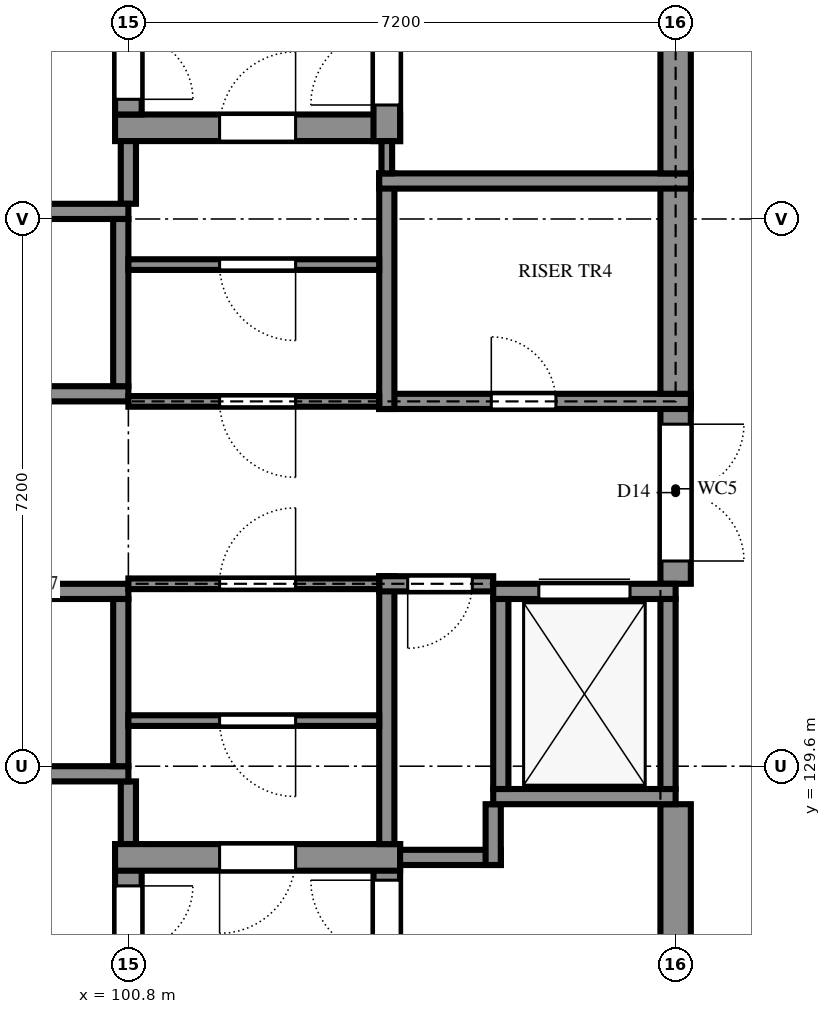
"""IFC4 building model, lengths in metres.
Left out: names, types, materials, properties, quantities, classifications, styles, units other than length and angle.
Written with IfcOpenShell. Run it as: python <this file> out.ifc"""

import sys

from ifc_helpers import new_model, si_unit, direction, frame, frame_2d, origin, place, context, subcontext, project, spatial, rectangle, extrude, element, fill, save


model = new_model("IFC4")
c1 = context("Model", 3, precision=1e-05, world=origin(), true_north=direction((0.0, 1.0)))
c2 = subcontext(c1, "Body", "Model", "MODEL_VIEW")
j1 = project(units=[si_unit("LENGTHUNIT", "METRE"), si_unit("PLANEANGLEUNIT", "RADIAN")], contexts=[c1])
p1 = place(None, origin())
s1 = spatial("IfcSite", under=j1, at=p1, CompositionType="ELEMENT")
p2 = place(p1, origin())
s2 = spatial("IfcBuilding", under=s1, at=p2, CompositionType="ELEMENT")
p3 = place(p2, origin())
s3 = spatial("IfcBuildingStorey", under=s2, at=p3, CompositionType="ELEMENT", Elevation=0.0)
p4 = place(p3, frame((108.0, 122.4, 0.0), z_axis=(0.0, 0.0, 1.0), x_axis=(0.0, 1.0, 0.0)))
e1 = element("IfcWall", 1, at=p4, inside=s3, PredefinedType="SHEAR", context=c2, shape_type="SweptSolid", body=[
    extrude(rectangle(XDim=6.7, YDim=0.4, at=frame_2d((3.35, 0.0))), origin(), (0.0, 0.0, 1.0), 3.6),
])
p5 = place(p3, frame((104.2, 125.1, 0.0), z_axis=(0.0, 0.0, 1.0), x_axis=(0.0, 1.0, 0.0)))
e2 = element("IfcWall", 2, at=p5, inside=s3, PredefinedType="SHEAR", context=c2, shape_type="SweptSolid", body=[
    extrude(rectangle(XDim=3.475, YDim=0.35, at=frame_2d((1.737, 0.0))), origin(), (0.0, 0.0, 1.0), 3.6),
])
p6 = place(p5, frame((2.0, 0.0, 0.0)))
e3 = element("IfcOpeningElement", 3, at=p6, cuts=e2, PredefinedType="OPENING", context=c2, shape_type="SweptSolid", body=[
    extrude(rectangle(XDim=1.0, YDim=2.1, at=frame_2d((0.5, 1.05))), frame((0.0, 0.185, 0.0), z_axis=(0.0, -1.0, 0.0), x_axis=(1.0, 0.0, 0.0)), (0.0, 0.0, 1.0), 0.37),
])
p7 = place(p3, frame((100.8, 128.575, 0.0), z_axis=(0.0, 0.0, 1.0), x_axis=(0.0, -1.0, 0.0)))
e4 = element("IfcWall", 4, at=p7, inside=s3, PredefinedType="SHEAR", context=c2, shape_type="SweptSolid", body=[
    extrude(rectangle(XDim=6.35, YDim=0.35, at=frame_2d((3.175, 0.0))), origin(), (0.0, 0.0, 1.0), 3.6),
])
p8 = place(p7, frame((0.55, 0.0, 0.0)))
e5 = element("IfcOpeningElement", 5, at=p8, cuts=e4, PredefinedType="OPENING", context=c2, shape_type="SweptSolid", body=[
    extrude(rectangle(XDim=0.85, YDim=2.1, at=frame_2d((0.425, 1.05))), frame((0.0, 0.185, 0.0), z_axis=(0.0, -1.0, 0.0), x_axis=(1.0, 0.0, 0.0)), (0.0, 0.0, 1.0), 0.37),
])
p9 = place(p3, frame((100.8, 128.575, 0.0), z_axis=(0.0, 0.0, 1.0), x_axis=(0.0, 1.0, 0.0)))
e6 = element("IfcWall", 6, at=p9, inside=s3, PredefinedType="SHEAR", context=c2, shape_type="SweptSolid", body=[
    extrude(rectangle(XDim=0.825, YDim=0.2, at=frame_2d((0.413, 0.0))), origin(), (0.0, 0.0, 1.0), 3.6),
])
p10 = place(p3, frame((104.375, 128.4, 0.0), z_axis=(0.0, 0.0, 1.0), x_axis=(-1.0, 0.0, 0.0)))
e7 = element("IfcWall", 7, at=p10, inside=s3, PredefinedType="SHEAR", context=c2, shape_type="SweptSolid", body=[
    extrude(rectangle(XDim=3.75, YDim=0.35, at=frame_2d((1.875, 0.0))), origin(), (0.0, 0.0, 1.0), 3.6),
])
p11 = place(p10, frame((1.375, 0.0, 0.0)))
e8 = element("IfcOpeningElement", 8, at=p11, cuts=e7, PredefinedType="OPENING", context=c2, shape_type="SweptSolid", body=[
    extrude(rectangle(XDim=1.0, YDim=2.1, at=frame_2d((0.5, 1.05))), frame((0.0, 0.185, 0.0), z_axis=(0.0, -1.0, 0.0), x_axis=(1.0, 0.0, 0.0)), (0.0, 0.0, 1.0), 0.37),
])
p12 = place(p3, frame((104.375, 128.4, 0.0), z_axis=(0.0, 0.0, 1.0), x_axis=(1.0, 0.0, 0.0)))
e9 = element("IfcWall", 9, at=p12, inside=s3, PredefinedType="SHEAR", context=c2, shape_type="SweptSolid", body=[
    extrude(rectangle(XDim=1.325, YDim=0.2, at=frame_2d((0.663, 0.0))), origin(), (0.0, 0.0, 1.0), 3.6),
])
p13 = place(p3, frame((105.6, 128.3, 0.0), z_axis=(0.0, 0.0, 1.0), x_axis=(0.0, 1.0, 0.0)))
e10 = element("IfcWall", 10, at=p13, inside=s3, PredefinedType="SHEAR", context=c2, shape_type="SweptSolid", body=[
    extrude(rectangle(XDim=0.8, YDim=0.2, at=frame_2d((0.4, 0.0))), origin(), (0.0, 0.0, 1.0), 3.6),
])
p14 = place(p3, frame((104.2, 132.1, 0.0), z_axis=(0.0, 0.0, 1.0), x_axis=(0.0, -1.0, 0.0)))
e11 = element("IfcWall", 11, at=p14, inside=s3, PredefinedType="SHEAR", context=c2, shape_type="SweptSolid", body=[
    extrude(rectangle(XDim=3.525, YDim=0.2, at=frame_2d((1.763, 0.0))), origin(), (0.0, 0.0, 1.0), 3.6),
])
p15 = place(p3, frame((105.6, 132.0, 0.0), z_axis=(0.0, 0.0, 1.0), x_axis=(-1.0, 0.0, 0.0)))
e12 = element("IfcWall", 12, at=p15, inside=s3, PredefinedType="SHEAR", context=c2, shape_type="SweptSolid", body=[
    extrude(rectangle(XDim=1.5, YDim=0.2, at=frame_2d((0.75, 0.0))), origin(), (0.0, 0.0, 1.0), 3.6),
])
p16 = place(p15, frame((0.275, 0.0, 0.0)))
e13 = element("IfcOpeningElement", 13, at=p16, cuts=e12, PredefinedType="OPENING", context=c2, shape_type="SweptSolid", body=[
    extrude(rectangle(XDim=0.85, YDim=2.1, at=frame_2d((0.425, 1.05))), frame((0.0, 0.11, 0.0), z_axis=(0.0, -1.0, 0.0), x_axis=(1.0, 0.0, 0.0)), (0.0, 0.0, 1.0), 0.22),
])
p17 = place(p3, frame((108.0, 132.0, 0.0), z_axis=(0.0, 0.0, 1.0), x_axis=(0.0, 1.0, 0.0)))
e14 = element("IfcWall", 14, at=p17, inside=s3, PredefinedType="SHEAR", context=c2, shape_type="SweptSolid", body=[
    extrude(rectangle(XDim=2.5, YDim=0.4, at=frame_2d((1.25, 0.0))), origin(), (0.0, 0.0, 1.0), 3.6),
])
p18 = place(p17, frame((0.3, 0.0, 0.0)))
e15 = element("IfcOpeningElement", 15, at=p18, cuts=e14, PredefinedType="OPENING", context=c2, shape_type="SweptSolid", body=[
    extrude(rectangle(XDim=1.8, YDim=2.1, at=frame_2d((0.9, 1.05))), frame((0.0, 0.21, 0.0), z_axis=(0.0, -1.0, 0.0), x_axis=(1.0, 0.0, 0.0)), (0.0, 0.0, 1.0), 0.42),
])
p19 = place(p3, frame((104.1, 134.4, 0.0), z_axis=(0.0, 0.0, 1.0), x_axis=(1.0, 0.0, 0.0)))
e16 = element("IfcWall", 16, at=p19, inside=s3, PredefinedType="SHEAR", context=c2, shape_type="SweptSolid", body=[
    extrude(rectangle(XDim=4.1, YDim=0.2, at=frame_2d((2.05, 0.0))), origin(), (0.0, 0.0, 1.0), 3.6),
])
p20 = place(p19, frame((1.475, 0.0, 0.0)))
e17 = element("IfcOpeningElement", 17, at=p20, cuts=e16, PredefinedType="OPENING", context=c2, shape_type="SweptSolid", body=[
    extrude(rectangle(XDim=0.85, YDim=2.1, at=frame_2d((0.425, 1.05))), frame((0.0, 0.11, 0.0), z_axis=(0.0, -1.0, 0.0), x_axis=(1.0, 0.0, 0.0)), (0.0, 0.0, 1.0), 0.22),
])
p21 = place(p3, frame((108.0, 134.5, 0.0), z_axis=(0.0, 0.0, 1.0), x_axis=(0.0, 1.0, 0.0)))
e18 = element("IfcWall", 18, at=p21, inside=s3, PredefinedType="SHEAR", context=c2, shape_type="SweptSolid", body=[
    extrude(rectangle(XDim=2.9, YDim=0.4, at=frame_2d((1.45, 0.0))), origin(), (0.0, 0.0, 1.0), 3.6),
])
p22 = place(p3, frame((100.8, 137.0, 0.0), z_axis=(0.0, 0.0, 1.0), x_axis=(0.0, 1.0, 0.0)))
e19 = element("IfcWall", 19, at=p22, inside=s3, PredefinedType="SHEAR", context=c2, shape_type="SweptSolid", body=[
    extrude(rectangle(XDim=1.175, YDim=0.2, at=frame_2d((0.587, 0.0))), origin(), (0.0, 0.0, 1.0), 3.6),
])
p23 = place(p3, frame((104.2, 137.4, 0.0), z_axis=(0.0, 0.0, 1.0), x_axis=(0.0, -1.0, 0.0)))
e20 = element("IfcWall", 20, at=p23, inside=s3, PredefinedType="SHEAR", context=c2, shape_type="SweptSolid", body=[
    extrude(rectangle(XDim=3.1, YDim=0.2, at=frame_2d((1.55, 0.0))), origin(), (0.0, 0.0, 1.0), 3.6),
])
p24 = place(p3, frame((108.2, 137.3, 0.0), z_axis=(0.0, 0.0, 1.0), x_axis=(-1.0, 0.0, 0.0)))
e21 = element("IfcWall", 21, at=p24, inside=s3, PredefinedType="SHEAR", context=c2, shape_type="SweptSolid", body=[
    extrude(rectangle(XDim=4.1, YDim=0.2, at=frame_2d((2.05, 0.0))), origin(), (0.0, 0.0, 1.0), 3.6),
])
p25 = place(p3, frame((108.0, 137.4, 0.0), z_axis=(0.0, 0.0, 1.0), x_axis=(0.0, 1.0, 0.0)))
e22 = element("IfcWall", 22, at=p25, inside=s3, PredefinedType="SHEAR", context=c2, shape_type="SweptSolid", body=[
    extrude(rectangle(XDim=6.6, YDim=0.4, at=frame_2d((3.3, 0.0))), origin(), (0.0, 0.0, 1.0), 3.6),
])
p26 = place(p3, frame((100.625, 138.0, 0.0), z_axis=(0.0, 0.0, 1.0), x_axis=(1.0, 0.0, 0.0)))
e23 = element("IfcWall", 23, at=p26, inside=s3, PredefinedType="SHEAR", context=c2, shape_type="SweptSolid", body=[
    extrude(rectangle(XDim=3.75, YDim=0.35, at=frame_2d((1.875, 0.0))), origin(), (0.0, 0.0, 1.0), 3.6),
])
p27 = place(p26, frame((1.375, 0.0, 0.0)))
e24 = element("IfcOpeningElement", 24, at=p27, cuts=e23, PredefinedType="OPENING", context=c2, shape_type="SweptSolid", body=[
    extrude(rectangle(XDim=1.0, YDim=2.1, at=frame_2d((0.5, 1.05))), frame((0.0, 0.185, 0.0), z_axis=(0.0, -1.0, 0.0), x_axis=(1.0, 0.0, 0.0)), (0.0, 0.0, 1.0), 0.37),
])
p28 = place(p3, frame((104.2, 137.825, 0.0), z_axis=(0.0, 0.0, 1.0), x_axis=(0.0, 1.0, 0.0)))
e25 = element("IfcWall", 25, at=p28, inside=s3, PredefinedType="SHEAR", context=c2, shape_type="SweptSolid", body=[
    extrude(rectangle(XDim=3.475, YDim=0.35, at=frame_2d((1.738, 0.0))), origin(), (0.0, 0.0, 1.0), 3.6),
])
p29 = place(p28, frame((0.475, 0.0, 0.0)))
e26 = element("IfcOpeningElement", 26, at=p29, cuts=e25, PredefinedType="OPENING", context=c2, shape_type="SweptSolid", body=[
    extrude(rectangle(XDim=1.0, YDim=2.1, at=frame_2d((0.5, 1.05))), frame((0.0, 0.185, 0.0), z_axis=(0.0, -1.0, 0.0), x_axis=(1.0, 0.0, 0.0)), (0.0, 0.0, 1.0), 0.37),
])
p30 = place(p3, frame((100.8, 144.175, 0.0), z_axis=(0.0, 0.0, 1.0), x_axis=(0.0, -1.0, 0.0)))
e27 = element("IfcWall", 27, at=p30, inside=s3, PredefinedType="SHEAR", context=c2, shape_type="SweptSolid", body=[
    extrude(rectangle(XDim=6.0, YDim=0.35, at=frame_2d((3.0, 0.0))), origin(), (0.0, 0.0, 1.0), 3.6),
])
p31 = place(p30, frame((4.95, 0.0, 0.0)))
e28 = element("IfcOpeningElement", 28, at=p31, cuts=e27, PredefinedType="OPENING", context=c2, shape_type="SweptSolid", body=[
    extrude(rectangle(XDim=0.85, YDim=2.1, at=frame_2d((0.425, 1.05))), frame((0.0, 0.185, 0.0), z_axis=(0.0, -1.0, 0.0), x_axis=(1.0, 0.0, 0.0)), (0.0, 0.0, 1.0), 0.37),
])
for number, where, z_axis, x_axis in (
    (29, (98.4, 129.5, 0.0), (0.0, 0.0, 1.0), (1.0, 0.0, 0.0)),
    (30, (98.4, 131.9, 0.0), (0.0, 0.0, 1.0), (1.0, 0.0, 0.0)),
):
    element("IfcWall", number, at=place(p3, frame(where, z_axis=z_axis, x_axis=x_axis)), inside=s3, PredefinedType="SHEAR", context=c2, shape_type="SweptSolid", body=[
        extrude(rectangle(XDim=2.4, YDim=0.2, at=frame_2d((1.2, 0.0))), origin(), (0.0, 0.0, 1.0), 3.6),
    ])
p32 = place(p3, frame((100.7, 129.6, 0.0), z_axis=(0.0, 0.0, 1.0), x_axis=(0.0, 1.0, 0.0)))
e31 = element("IfcWall", 31, at=p32, inside=s3, PredefinedType="SHEAR", context=c2, shape_type="SweptSolid", body=[
    extrude(rectangle(XDim=2.2, YDim=0.2, at=frame_2d((1.1, 0.0))), origin(), (0.0, 0.0, 1.0), 3.6),
])
for number, where, z_axis, x_axis in (
    (32, (98.4, 134.5, 0.0), (0.0, 0.0, 1.0), (1.0, 0.0, 0.0)),
    (33, (98.4, 136.9, 0.0), (0.0, 0.0, 1.0), (1.0, 0.0, 0.0)),
):
    element("IfcWall", number, at=place(p3, frame(where, z_axis=z_axis, x_axis=x_axis)), inside=s3, PredefinedType="SHEAR", context=c2, shape_type="SweptSolid", body=[
        extrude(rectangle(XDim=2.4, YDim=0.2, at=frame_2d((1.2, 0.0))), origin(), (0.0, 0.0, 1.0), 3.6),
    ])
p33 = place(p3, frame((100.7, 134.6, 0.0), z_axis=(0.0, 0.0, 1.0), x_axis=(0.0, 1.0, 0.0)))
e34 = element("IfcWall", 34, at=p33, inside=s3, PredefinedType="SHEAR", context=c2, shape_type="SweptSolid", body=[
    extrude(rectangle(XDim=2.2, YDim=0.2, at=frame_2d((1.1, 0.0))), origin(), (0.0, 0.0, 1.0), 3.6),
])
p34 = place(p3, frame((105.6, 129.2, -1.4), z_axis=(0.0, 0.0, 1.0), x_axis=(1.0, 0.0, 0.0)))
e35 = element("IfcWall", 35, at=p34, inside=s3, PredefinedType="SHEAR", context=c2, shape_type="SweptSolid", body=[
    extrude(rectangle(XDim=2.4, YDim=0.2, at=frame_2d((1.2, 0.0))), origin(), (0.0, 0.0, 1.0), 5.0),
])
p35 = place(p3, frame((105.6, 131.9, -1.4), z_axis=(0.0, 0.0, 1.0), x_axis=(1.0, 0.0, 0.0)))
e36 = element("IfcWall", 36, at=p35, inside=s3, PredefinedType="SHEAR", context=c2, shape_type="SweptSolid", body=[
    extrude(rectangle(XDim=2.4, YDim=0.2, at=frame_2d((1.2, 0.0))), origin(), (0.0, 0.0, 1.0), 5.0),
])
p36 = place(p35, frame((0.6, 0.0, 1.4)))
e37 = element("IfcOpeningElement", 37, at=p36, cuts=e36, PredefinedType="OPENING", context=c2, shape_type="SweptSolid", body=[
    extrude(rectangle(XDim=1.2, YDim=2.1, at=frame_2d((0.6, 1.05))), frame((0.0, 0.11, 0.0), z_axis=(0.0, -1.0, 0.0), x_axis=(1.0, 0.0, 0.0)), (0.0, 0.0, 1.0), 0.22),
])
for number, where, z_axis, x_axis in (
    (38, (105.7, 129.3, -1.4), (0.0, 0.0, 1.0), (0.0, 1.0, 0.0)),
    (39, (107.9, 129.3, -1.4), (0.0, 0.0, 1.0), (0.0, 1.0, 0.0)),
):
    element("IfcWall", number, at=place(p3, frame(where, z_axis=z_axis, x_axis=x_axis)), inside=s3, PredefinedType="SHEAR", context=c2, shape_type="SweptSolid", body=[
        extrude(rectangle(XDim=2.5, YDim=0.2, at=frame_2d((1.25, 0.0))), origin(), (0.0, 0.0, 1.0), 5.0),
    ])
p37 = place(p3, frame((100.8, 130.2, 0.0), z_axis=(0.0, 0.0, 1.0), x_axis=(1.0, 0.0, 0.0)))
e40 = element("IfcWall", 40, at=p37, inside=s3, PredefinedType="PARTITIONING", context=c2, shape_type="SweptSolid", body=[
    extrude(rectangle(XDim=3.3, YDim=0.14, at=frame_2d((1.65, 0.0))), origin(), (0.0, 0.0, 1.0), 3.42),
])
p38 = place(p37, frame((1.2, 0.0, 0.0)))
e41 = element("IfcOpeningElement", 41, at=p38, cuts=e40, PredefinedType="OPENING", context=c2, shape_type="SweptSolid", body=[
    extrude(rectangle(XDim=1.0, YDim=2.1, at=frame_2d((0.5, 1.05))), frame((0.0, 0.08, 0.0), z_axis=(0.0, -1.0, 0.0), x_axis=(1.0, 0.0, 0.0)), (0.0, 0.0, 1.0), 0.16),
])
p39 = place(p3, frame((100.8, 132.0, 0.0), z_axis=(0.0, 0.0, 1.0), x_axis=(1.0, 0.0, 0.0)))
e42 = element("IfcWall", 42, at=p39, inside=s3, PredefinedType="PARTITIONING", context=c2, shape_type="SweptSolid", body=[
    extrude(rectangle(XDim=3.3, YDim=0.14, at=frame_2d((1.65, 0.0))), origin(), (0.0, 0.0, 1.0), 3.42),
])
p40 = place(p39, frame((1.2, 0.0, 0.0)))
e43 = element("IfcOpeningElement", 43, at=p40, cuts=e42, PredefinedType="OPENING", context=c2, shape_type="SweptSolid", body=[
    extrude(rectangle(XDim=1.0, YDim=2.1, at=frame_2d((0.5, 1.05))), frame((0.0, 0.08, 0.0), z_axis=(0.0, -1.0, 0.0), x_axis=(1.0, 0.0, 0.0)), (0.0, 0.0, 1.0), 0.16),
])
p41 = place(p3, frame((100.8, 134.4, 0.0), z_axis=(0.0, 0.0, 1.0), x_axis=(1.0, 0.0, 0.0)))
e44 = element("IfcWall", 44, at=p41, inside=s3, PredefinedType="PARTITIONING", context=c2, shape_type="SweptSolid", body=[
    extrude(rectangle(XDim=3.3, YDim=0.14, at=frame_2d((1.65, 0.0))), origin(), (0.0, 0.0, 1.0), 3.42),
])
p42 = place(p41, frame((1.2, 0.0, 0.0)))
e45 = element("IfcOpeningElement", 45, at=p42, cuts=e44, PredefinedType="OPENING", context=c2, shape_type="SweptSolid", body=[
    extrude(rectangle(XDim=1.0, YDim=2.1, at=frame_2d((0.5, 1.05))), frame((0.0, 0.08, 0.0), z_axis=(0.0, -1.0, 0.0), x_axis=(1.0, 0.0, 0.0)), (0.0, 0.0, 1.0), 0.16),
])
p43 = place(p3, frame((100.8, 136.2, 0.0), z_axis=(0.0, 0.0, 1.0), x_axis=(1.0, 0.0, 0.0)))
e46 = element("IfcWall", 46, at=p43, inside=s3, PredefinedType="PARTITIONING", context=c2, shape_type="SweptSolid", body=[
    extrude(rectangle(XDim=3.3, YDim=0.14, at=frame_2d((1.65, 0.0))), origin(), (0.0, 0.0, 1.0), 3.42),
])
p44 = place(p43, frame((1.2, 0.0, 0.0)))
e47 = element("IfcOpeningElement", 47, at=p44, cuts=e46, PredefinedType="OPENING", context=c2, shape_type="SweptSolid", body=[
    extrude(rectangle(XDim=1.0, YDim=2.1, at=frame_2d((0.5, 1.05))), frame((0.0, 0.08, 0.0), z_axis=(0.0, -1.0, 0.0), x_axis=(1.0, 0.0, 0.0)), (0.0, 0.0, 1.0), 0.16),
])
p45 = place(p3, frame((104.2, 137.4, 0.0), z_axis=(0.0, 0.0, 1.0), x_axis=(0.0, 1.0, 0.0)))
e48 = element("IfcWall", 48, at=p45, inside=s3, PredefinedType="PARTITIONING", context=c2, shape_type="SweptSolid", body=[
    extrude(rectangle(XDim=0.425, YDim=0.14, at=frame_2d((0.212, 0.0))), origin(), (0.0, 0.0, 1.0), 3.42),
])
p46 = place(p36, origin())
e49 = element("IfcDoor", 49, at=p46, inside=s3, OperationType="SLIDING_TO_LEFT", PredefinedType="DOOR", context=c2, shape_type="SweptSolid", body=[
    extrude(rectangle(XDim=1.2, YDim=2.1, at=frame_2d((0.6, 1.05))), frame((0.0, 0.025, 0.0), z_axis=(0.0, -1.0, 0.0), x_axis=(1.0, 0.0, 0.0)), (0.0, 0.0, 1.0), 0.05),
])
fill(e37, e49)
p47 = place(p38, frame((1.0, 0.0, 0.0), z_axis=(0.0, 0.0, 1.0), x_axis=(-1.0, 0.0, 0.0)))
e50 = element("IfcDoor", 50, at=p47, inside=s3, OperationType="SINGLE_SWING_RIGHT", PredefinedType="DOOR", context=c2, shape_type="SweptSolid", body=[
    extrude(rectangle(XDim=1.0, YDim=2.1, at=frame_2d((0.5, 1.05))), frame((0.0, 0.025, 0.0), z_axis=(0.0, -1.0, 0.0), x_axis=(1.0, 0.0, 0.0)), (0.0, 0.0, 1.0), 0.05),
])
fill(e41, e50)
p48 = place(p40, origin())
e51 = element("IfcDoor", 51, at=p48, inside=s3, OperationType="SINGLE_SWING_LEFT", PredefinedType="DOOR", context=c2, shape_type="SweptSolid", body=[
    extrude(rectangle(XDim=1.0, YDim=2.1, at=frame_2d((0.5, 1.05))), frame((0.0, 0.025, 0.0), z_axis=(0.0, -1.0, 0.0), x_axis=(1.0, 0.0, 0.0)), (0.0, 0.0, 1.0), 0.05),
])
fill(e43, e51)
p49 = place(p42, frame((1.0, 0.0, 0.0), z_axis=(0.0, 0.0, 1.0), x_axis=(-1.0, 0.0, 0.0)))
e52 = element("IfcDoor", 52, at=p49, inside=s3, OperationType="SINGLE_SWING_RIGHT", PredefinedType="DOOR", context=c2, shape_type="SweptSolid", body=[
    extrude(rectangle(XDim=1.0, YDim=2.1, at=frame_2d((0.5, 1.05))), frame((0.0, 0.025, 0.0), z_axis=(0.0, -1.0, 0.0), x_axis=(1.0, 0.0, 0.0)), (0.0, 0.0, 1.0), 0.05),
])
fill(e45, e52)
p50 = place(p44, frame((1.0, 0.0, 0.0), z_axis=(0.0, 0.0, 1.0), x_axis=(-1.0, 0.0, 0.0)))
e53 = element("IfcDoor", 53, at=p50, inside=s3, OperationType="SINGLE_SWING_RIGHT", PredefinedType="DOOR", context=c2, shape_type="SweptSolid", body=[
    extrude(rectangle(XDim=1.0, YDim=2.1, at=frame_2d((0.5, 1.05))), frame((0.0, 0.025, 0.0), z_axis=(0.0, -1.0, 0.0), x_axis=(1.0, 0.0, 0.0)), (0.0, 0.0, 1.0), 0.05),
])
fill(e47, e53)
p51 = place(p11, origin())
e54 = element("IfcDoor", 54, at=p51, inside=s3, OperationType="SINGLE_SWING_LEFT", PredefinedType="DOOR", context=c2, shape_type="SweptSolid", body=[
    extrude(rectangle(XDim=1.0, YDim=2.1, at=frame_2d((0.5, 1.05))), frame((0.0, 0.025, 0.0), z_axis=(0.0, -1.0, 0.0), x_axis=(1.0, 0.0, 0.0)), (0.0, 0.0, 1.0), 0.05),
])
fill(e8, e54)
p52 = place(p8, origin())
e55 = element("IfcDoor", 55, at=p52, inside=s3, OperationType="SINGLE_SWING_RIGHT", PredefinedType="DOOR", context=c2, shape_type="SweptSolid", body=[
    extrude(rectangle(XDim=0.85, YDim=2.1, at=frame_2d((0.425, 1.05))), frame((0.0, 0.025, 0.0), z_axis=(0.0, -1.0, 0.0), x_axis=(1.0, 0.0, 0.0)), (0.0, 0.0, 1.0), 0.05),
])
fill(e5, e55)
p53 = place(p6, origin())
e56 = element("IfcDoor", 56, at=p53, inside=s3, OperationType="SINGLE_SWING_LEFT", PredefinedType="DOOR", context=c2, shape_type="SweptSolid", body=[
    extrude(rectangle(XDim=1.0, YDim=2.1, at=frame_2d((0.5, 1.05))), frame((0.0, 0.025, 0.0), z_axis=(0.0, -1.0, 0.0), x_axis=(1.0, 0.0, 0.0)), (0.0, 0.0, 1.0), 0.05),
])
fill(e3, e56)
p54 = place(p16, origin())
e57 = element("IfcDoor", 57, at=p54, inside=s3, OperationType="SINGLE_SWING_LEFT", PredefinedType="DOOR", context=c2, shape_type="SweptSolid", body=[
    extrude(rectangle(XDim=0.85, YDim=2.1, at=frame_2d((0.425, 1.05))), frame((0.0, 0.025, 0.0), z_axis=(0.0, -1.0, 0.0), x_axis=(1.0, 0.0, 0.0)), (0.0, 0.0, 1.0), 0.05),
])
fill(e13, e57)
p55 = place(p20, origin())
e58 = element("IfcDoor", 58, at=p55, inside=s3, OperationType="SINGLE_SWING_RIGHT", PredefinedType="DOOR", context=c2, shape_type="SweptSolid", body=[
    extrude(rectangle(XDim=0.85, YDim=2.1, at=frame_2d((0.425, 1.05))), frame((0.0, 0.025, 0.0), z_axis=(0.0, -1.0, 0.0), x_axis=(1.0, 0.0, 0.0)), (0.0, 0.0, 1.0), 0.05),
])
fill(e17, e58)
p56 = place(p27, origin())
e59 = element("IfcDoor", 59, at=p56, inside=s3, OperationType="SINGLE_SWING_LEFT", PredefinedType="DOOR", context=c2, shape_type="SweptSolid", body=[
    extrude(rectangle(XDim=1.0, YDim=2.1, at=frame_2d((0.5, 1.05))), frame((0.0, 0.025, 0.0), z_axis=(0.0, -1.0, 0.0), x_axis=(1.0, 0.0, 0.0)), (0.0, 0.0, 1.0), 0.05),
])
fill(e24, e59)
p57 = place(p31, origin())
e60 = element("IfcDoor", 60, at=p57, inside=s3, OperationType="SINGLE_SWING_LEFT", PredefinedType="DOOR", context=c2, shape_type="SweptSolid", body=[
    extrude(rectangle(XDim=0.85, YDim=2.1, at=frame_2d((0.425, 1.05))), frame((0.0, 0.025, 0.0), z_axis=(0.0, -1.0, 0.0), x_axis=(1.0, 0.0, 0.0)), (0.0, 0.0, 1.0), 0.05),
])
fill(e28, e60)
p58 = place(p29, origin())
e61 = element("IfcDoor", 61, at=p58, inside=s3, OperationType="SINGLE_SWING_RIGHT", PredefinedType="DOOR", context=c2, shape_type="SweptSolid", body=[
    extrude(rectangle(XDim=1.0, YDim=2.1, at=frame_2d((0.5, 1.05))), frame((0.0, 0.025, 0.0), z_axis=(0.0, -1.0, 0.0), x_axis=(1.0, 0.0, 0.0)), (0.0, 0.0, 1.0), 0.05),
])
fill(e26, e61)
p59 = place(p18, frame((1.8, 0.0, 0.0), z_axis=(0.0, 0.0, 1.0), x_axis=(-1.0, 0.0, 0.0)))
e62 = element("IfcDoor", 62, at=p59, inside=s3, OperationType="DOUBLE_DOOR_SINGLE_SWING", PredefinedType="DOOR", context=c2, shape_type="SweptSolid", body=[
    extrude(rectangle(XDim=1.8, YDim=2.1, at=frame_2d((0.9, 1.05))), frame((0.0, 0.025, 0.0), z_axis=(0.0, -1.0, 0.0), x_axis=(1.0, 0.0, 0.0)), (0.0, 0.0, 1.0), 0.05),
])
fill(e15, e62)
save(model, sys.argv[1])
